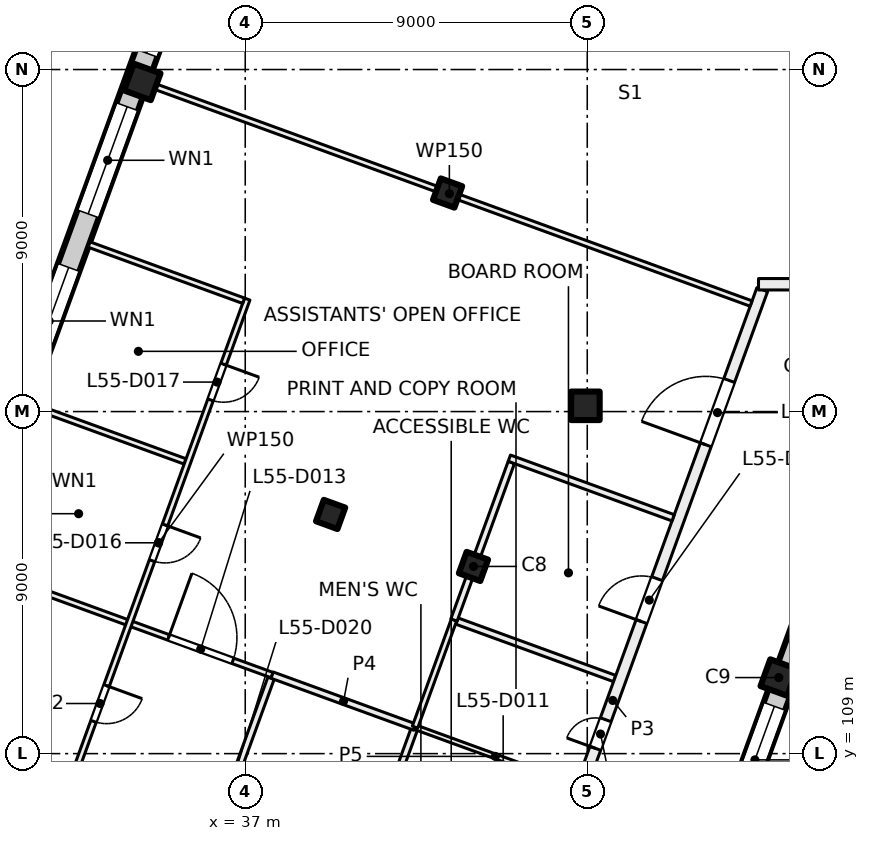
"""IFC4 building model, lengths in metres.
Left out: names, types, materials, properties, quantities, classifications, styles, units other than length and angle.
Written with IfcOpenShell. Run it as: python <this file> out.ifc"""

import sys

from ifc_helpers import new_model, si_unit, direction, frame, frame_2d, origin, origin_2d, place, context, subcontext, project, spatial, rectangle, extrude, element, fill, save


model = new_model("IFC4")
c1 = context("Model", 3, precision=1e-05, world=origin(), true_north=direction((0.0, 1.0)))
c2 = subcontext(c1, "Body", "Model", "MODEL_VIEW")
j1 = project(units=[si_unit("LENGTHUNIT", "METRE"), si_unit("PLANEANGLEUNIT", "RADIAN")], contexts=[c1])
p1 = place(None, origin())
s1 = spatial("IfcSite", under=j1, at=p1, CompositionType="ELEMENT")
p2 = place(p1, origin())
s2 = spatial("IfcBuilding", under=s1, at=p2, CompositionType="ELEMENT")
p3 = place(p2, frame((0.0, 0.0, 232.0)))
s3 = spatial("IfcBuildingStorey", under=s2, at=p3, CompositionType="ELEMENT", Elevation=232.0)
p4 = place(p3, frame((45.952, 118.152, 0.0), z_axis=(0.0, 0.0, 1.0), x_axis=(1.0, 0.0, 0.0)))
e1 = element("IfcColumn", 1, at=p4, inside=s3, PredefinedType="COLUMN", context=c2, shape_type="SweptSolid", body=[
    extrude(rectangle(XDim=0.75, YDim=0.75, at=origin_2d()), origin(), (0.0, 0.0, 1.0), 4.0),
])
for number, where, z_axis, x_axis in (
    (2, (43.006, 113.925, 0.0), (0.0, 0.0, 1.0), (-0.342, -0.94, 0.0)),
    (3, (42.325, 123.751, 0.0), (0.0, 0.0, 1.0), (-0.342, -0.94, 0.0)),
    (4, (39.247, 115.293, 0.0), (0.0, 0.0, 1.0), (-0.342, -0.94, 0.0)),
):
    element("IfcColumn", number, at=place(p3, frame(where, z_axis=z_axis, x_axis=x_axis)), inside=s3, PredefinedType="COLUMN", context=c2, shape_type="SweptSolid", body=[
        extrude(rectangle(XDim=0.6, YDim=0.6, at=origin_2d()), origin(), (0.0, 0.0, 1.0), 4.0),
    ])
for number, where, z_axis, x_axis in (
    (5, (51.04, 111.001, 0.0), (0.0, 0.0, 1.0), (-0.342, -0.94, 0.0)),
    (6, (34.291, 126.675, 0.0), (0.0, 0.0, 1.0), (-0.342, -0.94, 0.0)),
):
    element("IfcColumn", number, at=place(p3, frame(where, z_axis=z_axis, x_axis=x_axis)), inside=s3, PredefinedType="COLUMN", context=c2, shape_type="SweptSolid", body=[
        extrude(rectangle(XDim=0.75, YDim=0.75, at=origin_2d()), origin(), (0.0, 0.0, 1.0), 4.0),
    ])
p5 = place(p3, frame((52.212, 113.783, 0.0), z_axis=(0.0, 0.0, 1.0), x_axis=(-0.34202521188, -0.939690775968, 0.0)))
e7 = element("IfcWall", 7, at=p5, inside=s3, PredefinedType="SOLIDWALL", context=c2, shape_type="SweptSolid", body=[
    extrude(rectangle(XDim=21.745, YDim=0.6, at=frame_2d((10.873, 0.0))), origin(), (0.0, 0.0, 1.0), 3.625),
])
p6 = place(p5, frame((3.765, 0.0, 0.9)))
e8 = element("IfcOpeningElement", 8, at=p6, cuts=e7, PredefinedType="OPENING", context=c2, shape_type="SweptSolid", body=[
    extrude(rectangle(XDim=3.0, YDim=2.4, at=frame_2d((1.5, 1.2))), frame((0.0, 0.31, 0.0), z_axis=(0.0, -1.0, 0.0), x_axis=(1.0, 0.0, 0.0)), (0.0, 0.0, 1.0), 0.62),
])
p7 = place(p5, frame((8.265, 0.0, 0.9)))
e9 = element("IfcOpeningElement", 9, at=p7, cuts=e7, PredefinedType="OPENING", context=c2, shape_type="SweptSolid", body=[
    extrude(rectangle(XDim=3.0, YDim=2.4, at=frame_2d((1.5, 1.2))), frame((0.0, 0.31, 0.0), z_axis=(0.0, -1.0, 0.0), x_axis=(1.0, 0.0, 0.0)), (0.0, 0.0, 1.0), 0.62),
])
p8 = place(p5, frame((12.765, 0.0, 0.9)))
e10 = element("IfcOpeningElement", 10, at=p8, cuts=e7, PredefinedType="OPENING", context=c2, shape_type="SweptSolid", body=[
    extrude(rectangle(XDim=3.0, YDim=2.4, at=frame_2d((1.5, 1.2))), frame((0.0, 0.31, 0.0), z_axis=(0.0, -1.0, 0.0), x_axis=(1.0, 0.0, 0.0)), (0.0, 0.0, 1.0), 0.62),
])
p9 = place(p5, frame((17.265, 0.0, 0.9)))
e11 = element("IfcOpeningElement", 11, at=p9, cuts=e7, PredefinedType="OPENING", context=c2, shape_type="SweptSolid", body=[
    extrude(rectangle(XDim=3.0, YDim=2.4, at=frame_2d((1.5, 1.2))), frame((0.0, 0.31, 0.0), z_axis=(0.0, -1.0, 0.0), x_axis=(1.0, 0.0, 0.0)), (0.0, 0.0, 1.0), 0.62),
])
p10 = place(p3, frame((24.666, 100.669, 0.0), z_axis=(0.0, 0.0, 1.0), x_axis=(0.34201964167, 0.939692803373, 0.0)))
e12 = element("IfcWall", 12, at=p10, inside=s3, PredefinedType="SOLIDWALL", context=c2, shape_type="SweptSolid", body=[
    extrude(rectangle(XDim=32.884, YDim=0.6, at=frame_2d((16.442, 0.0))), origin(), (0.0, 0.0, 1.0), 3.625),
])
p11 = place(p10, frame((1.48, 0.0, 0.9)))
e13 = element("IfcOpeningElement", 13, at=p11, cuts=e12, PredefinedType="OPENING", context=c2, shape_type="SweptSolid", body=[
    extrude(rectangle(XDim=3.0, YDim=2.4, at=frame_2d((1.5, 1.2))), frame((0.0, 0.31, 0.0), z_axis=(0.0, -1.0, 0.0), x_axis=(1.0, 0.0, 0.0)), (0.0, 0.0, 1.0), 0.62),
])
p12 = place(p10, frame((5.98, 0.0, 0.9)))
e14 = element("IfcOpeningElement", 14, at=p12, cuts=e12, PredefinedType="OPENING", context=c2, shape_type="SweptSolid", body=[
    extrude(rectangle(XDim=3.0, YDim=2.4, at=frame_2d((1.5, 1.2))), frame((0.0, 0.31, 0.0), z_axis=(0.0, -1.0, 0.0), x_axis=(1.0, 0.0, 0.0)), (0.0, 0.0, 1.0), 0.62),
])
p13 = place(p10, frame((10.48, 0.0, 0.9)))
e15 = element("IfcOpeningElement", 15, at=p13, cuts=e12, PredefinedType="OPENING", context=c2, shape_type="SweptSolid", body=[
    extrude(rectangle(XDim=3.0, YDim=2.4, at=frame_2d((1.5, 1.2))), frame((0.0, 0.31, 0.0), z_axis=(0.0, -1.0, 0.0), x_axis=(1.0, 0.0, 0.0)), (0.0, 0.0, 1.0), 0.62),
])
p14 = place(p10, frame((14.98, 0.0, 0.9)))
e16 = element("IfcOpeningElement", 16, at=p14, cuts=e12, PredefinedType="OPENING", context=c2, shape_type="SweptSolid", body=[
    extrude(rectangle(XDim=3.0, YDim=2.4, at=frame_2d((1.5, 1.2))), frame((0.0, 0.31, 0.0), z_axis=(0.0, -1.0, 0.0), x_axis=(1.0, 0.0, 0.0)), (0.0, 0.0, 1.0), 0.62),
])
p15 = place(p10, frame((19.48, 0.0, 0.9)))
e17 = element("IfcOpeningElement", 17, at=p15, cuts=e12, PredefinedType="OPENING", context=c2, shape_type="SweptSolid", body=[
    extrude(rectangle(XDim=3.0, YDim=2.4, at=frame_2d((1.5, 1.2))), frame((0.0, 0.31, 0.0), z_axis=(0.0, -1.0, 0.0), x_axis=(1.0, 0.0, 0.0)), (0.0, 0.0, 1.0), 0.62),
])
p16 = place(p10, frame((23.98, 0.0, 0.9)))
e18 = element("IfcOpeningElement", 18, at=p16, cuts=e12, PredefinedType="OPENING", context=c2, shape_type="SweptSolid", body=[
    extrude(rectangle(XDim=3.0, YDim=2.4, at=frame_2d((1.5, 1.2))), frame((0.0, 0.31, 0.0), z_axis=(0.0, -1.0, 0.0), x_axis=(1.0, 0.0, 0.0)), (0.0, 0.0, 1.0), 0.62),
])
p17 = place(p10, frame((28.48, 0.0, 0.9)))
e19 = element("IfcOpeningElement", 19, at=p17, cuts=e12, PredefinedType="OPENING", context=c2, shape_type="SweptSolid", body=[
    extrude(rectangle(XDim=3.0, YDim=2.4, at=frame_2d((1.5, 1.2))), frame((0.0, 0.31, 0.0), z_axis=(0.0, -1.0, 0.0), x_axis=(1.0, 0.0, 0.0)), (0.0, 0.0, 1.0), 0.62),
])
p18 = place(p3, frame((29.814, 113.938, 0.0), z_axis=(0.0, 0.0, 1.0), x_axis=(0.939698351515, -0.342004397867, 0.0)))
e20 = element("IfcWall", 20, at=p18, inside=s3, PredefinedType="PARTITIONING", context=c2, shape_type="SweptSolid", body=[
    extrude(rectangle(XDim=8.401, YDim=0.15, at=frame_2d((4.2, 0.0))), origin(), (0.0, 0.0, 1.0), 3.625),
])
p19 = place(p18, frame((5.5, 0.0, 0.0)))
e21 = element("IfcOpeningElement", 21, at=p19, cuts=e20, PredefinedType="OPENING", context=c2, shape_type="SweptSolid", body=[
    extrude(rectangle(XDim=1.8, YDim=2.1, at=frame_2d((0.9, 1.05))), frame((0.0, 0.085, 0.0), z_axis=(0.0, -1.0, 0.0), x_axis=(1.0, 0.0, 0.0)), (0.0, 0.0, 1.0), 0.17),
])
p20 = place(p3, frame((31.353, 118.166, 0.0), z_axis=(0.0, 0.0, 1.0), x_axis=(0.939803311208, -0.341715870634, 0.0)))
e22 = element("IfcWall", 22, at=p20, inside=s3, PredefinedType="PARTITIONING", context=c2, shape_type="SweptSolid", body=[
    extrude(rectangle(XDim=4.325, YDim=0.15, at=frame_2d((2.163, 0.0))), origin(), (0.0, 0.0, 1.0), 3.625),
])
p21 = place(p3, frame((32.34, 108.23, 0.0), z_axis=(0.0, 0.0, 1.0), x_axis=(-0.939737385516, 0.341897128188, 0.0)))
e23 = element("IfcWall", 23, at=p21, inside=s3, PredefinedType="PARTITIONING", context=c2, shape_type="SweptSolid", body=[
    extrude(rectangle(XDim=4.326, YDim=0.15, at=frame_2d((2.163, 0.0))), origin(), (0.0, 0.0, 1.0), 3.625),
])
p22 = place(p3, frame((37.053, 120.96, 0.0), z_axis=(0.0, 0.0, 1.0), x_axis=(-0.342064742067, -0.939676386973, 0.0)))
e24 = element("IfcWall", 24, at=p22, inside=s3, PredefinedType="PARTITIONING", context=c2, shape_type="SweptSolid", body=[
    extrude(rectangle(XDim=13.649, YDim=0.15, at=frame_2d((6.825, 0.0))), origin(), (0.0, 0.0, 1.0), 3.625),
])
p23 = place(p22, frame((10.824, 0.0, 0.0)))
e25 = element("IfcOpeningElement", 25, at=p23, cuts=e24, PredefinedType="OPENING", context=c2, shape_type="SweptSolid", body=[
    extrude(rectangle(XDim=1.0, YDim=2.1, at=frame_2d((0.5, 1.05))), frame((0.0, 0.085, 0.0), z_axis=(0.0, -1.0, 0.0), x_axis=(1.0, 0.0, 0.0)), (0.0, 0.0, 1.0), 0.17),
])
p24 = place(p22, frame((6.324, 0.0, 0.0)))
e26 = element("IfcOpeningElement", 26, at=p24, cuts=e24, PredefinedType="OPENING", context=c2, shape_type="SweptSolid", body=[
    extrude(rectangle(XDim=1.0, YDim=2.1, at=frame_2d((0.5, 1.05))), frame((0.0, 0.085, 0.0), z_axis=(0.0, -1.0, 0.0), x_axis=(1.0, 0.0, 0.0)), (0.0, 0.0, 1.0), 0.17),
])
p25 = place(p22, frame((1.824, 0.0, 0.0)))
e27 = element("IfcOpeningElement", 27, at=p25, cuts=e24, PredefinedType="OPENING", context=c2, shape_type="SweptSolid", body=[
    extrude(rectangle(XDim=1.0, YDim=2.1, at=frame_2d((0.5, 1.05))), frame((0.0, 0.085, 0.0), z_axis=(0.0, -1.0, 0.0), x_axis=(1.0, 0.0, 0.0)), (0.0, 0.0, 1.0), 0.17),
])
p26 = place(p3, frame((32.892, 122.395, 0.0), z_axis=(0.0, 0.0, 1.0), x_axis=(0.93973078783, -0.341915262023, 0.0)))
e28 = element("IfcWall", 28, at=p26, inside=s3, PredefinedType="PARTITIONING", context=c2, shape_type="SweptSolid", body=[
    extrude(rectangle(XDim=4.326, YDim=0.15, at=frame_2d((2.163, 0.0))), origin(), (0.0, 0.0, 1.0), 3.625),
])
p27 = place(p3, frame((34.66, 102.689, 0.0), z_axis=(0.0, 0.0, 1.0), x_axis=(0.341951828534, 0.939717482524, 0.0)))
e29 = element("IfcWall", 29, at=p27, inside=s3, PredefinedType="PARTITIONING", context=c2, shape_type="SweptSolid", body=[
    extrude(rectangle(XDim=8.826, YDim=0.175, at=frame_2d((4.413, 0.0))), origin(), (0.0, 0.0, 1.0), 3.625),
])
p28 = place(p27, frame((4.813, 0.0, 0.0)))
e30 = element("IfcOpeningElement", 30, at=p28, cuts=e29, PredefinedType="OPENING", context=c2, shape_type="SweptSolid", body=[
    extrude(rectangle(XDim=1.2, YDim=2.1, at=frame_2d((0.6, 1.05))), frame((0.0, 0.097, 0.0), z_axis=(0.0, -1.0, 0.0), x_axis=(1.0, 0.0, 0.0)), (0.0, 0.0, 1.0), 0.195),
])
p29 = place(p3, frame((38.418, 101.322, 0.0), z_axis=(0.0, 0.0, 1.0), x_axis=(0.342101536507, 0.939662992099, 0.0)))
e31 = element("IfcWall", 31, at=p29, inside=s3, PredefinedType="PARTITIONING", context=c2, shape_type="SweptSolid", body=[
    extrude(rectangle(XDim=8.913, YDim=0.175, at=frame_2d((4.457, 0.0))), origin(), (0.0, 0.0, 1.0), 3.625),
])
p30 = place(p3, frame((41.467, 109.697, 0.0), z_axis=(0.0, 0.0, 1.0), x_axis=(-0.939713209288, 0.341963571582, 0.0)))
e32 = element("IfcWall", 32, at=p30, inside=s3, PredefinedType="PARTITIONING", context=c2, shape_type="SweptSolid", body=[
    extrude(rectangle(XDim=4.0, YDim=0.175, at=frame_2d((2.0, 0.0))), origin(), (0.0, 0.0, 1.0), 3.625),
])
p31 = place(p3, frame((41.467, 109.697, 0.0), z_axis=(0.0, 0.0, 1.0), x_axis=(0.939609529273, -0.342248349154, 0.0)))
e33 = element("IfcWall", 33, at=p31, inside=s3, PredefinedType="PARTITIONING", context=c2, shape_type="SweptSolid", body=[
    extrude(rectangle(XDim=4.5, YDim=0.125, at=frame_2d((2.25, 0.0))), origin(), (0.0, 0.0, 1.0), 3.625),
])
p32 = place(p3, frame((42.493, 112.516, 0.0), z_axis=(0.0, 0.0, 1.0), x_axis=(-0.341965219194, -0.939712609717, 0.0)))
e34 = element("IfcWall", 34, at=p32, inside=s3, PredefinedType="PARTITIONING", context=c2, shape_type="SweptSolid", body=[
    extrude(rectangle(XDim=3.0, YDim=0.15, at=frame_2d((1.5, 0.0))), origin(), (0.0, 0.0, 1.0), 3.625),
])
p33 = place(p3, frame((42.575, 112.486, 0.0), z_axis=(0.0, 0.0, 1.0), x_axis=(0.939620446327, -0.342218375959, 0.0)))
e35 = element("IfcWall", 35, at=p33, inside=s3, PredefinedType="PARTITIONING", context=c2, shape_type="SweptSolid", body=[
    extrude(rectangle(XDim=4.412, YDim=0.175, at=frame_2d((2.206, 0.0))), origin(), (0.0, 0.0, 1.0), 3.625),
])
p34 = place(p3, frame((42.737, 99.59, 0.0), z_axis=(0.0, 0.0, 1.0), x_axis=(0.341992703977, 0.939702607438, 0.0)))
e36 = element("IfcWall", 36, at=p34, inside=s3, PredefinedType="PARTITIONING", context=c2, shape_type="SweptSolid", body=[
    extrude(rectangle(XDim=23.006, YDim=0.3, at=frame_2d((11.503, 0.0))), origin(), (0.0, 0.0, 1.0), 3.625),
])
p35 = place(p34, frame((4.062, 0.0, 0.0)))
e37 = element("IfcOpeningElement", 37, at=p35, cuts=e36, PredefinedType="OPENING", context=c2, shape_type="SweptSolid", body=[
    extrude(rectangle(XDim=1.0, YDim=2.1, at=frame_2d((0.5, 1.05))), frame((0.0, 0.16, 0.0), z_axis=(0.0, -1.0, 0.0), x_axis=(1.0, 0.0, 0.0)), (0.0, 0.0, 1.0), 0.32),
])
p36 = place(p34, frame((10.162, 0.0, 0.0)))
e38 = element("IfcOpeningElement", 38, at=p36, cuts=e36, PredefinedType="OPENING", context=c2, shape_type="SweptSolid", body=[
    extrude(rectangle(XDim=0.8, YDim=2.1, at=frame_2d((0.4, 1.05))), frame((0.0, 0.16, 0.0), z_axis=(0.0, -1.0, 0.0), x_axis=(1.0, 0.0, 0.0)), (0.0, 0.0, 1.0), 0.32),
])
p37 = place(p34, frame((13.712, 0.0, 0.0)))
e39 = element("IfcOpeningElement", 39, at=p37, cuts=e36, PredefinedType="OPENING", context=c2, shape_type="SweptSolid", body=[
    extrude(rectangle(XDim=1.2, YDim=2.1, at=frame_2d((0.6, 1.05))), frame((0.0, 0.16, 0.0), z_axis=(0.0, -1.0, 0.0), x_axis=(1.0, 0.0, 0.0)), (0.0, 0.0, 1.0), 0.32),
])
p38 = place(p34, frame((18.662, 0.0, 0.0)))
e40 = element("IfcOpeningElement", 40, at=p38, cuts=e36, PredefinedType="OPENING", context=c2, shape_type="SweptSolid", body=[
    extrude(rectangle(XDim=1.8, YDim=2.1, at=frame_2d((0.9, 1.05))), frame((0.0, 0.16, 0.0), z_axis=(0.0, -1.0, 0.0), x_axis=(1.0, 0.0, 0.0)), (0.0, 0.0, 1.0), 0.32),
])
p39 = place(p3, frame((44.002, 116.662, 0.0), z_axis=(0.0, 0.0, 1.0), x_axis=(-0.342022951975, -0.939691598517, 0.0)))
e41 = element("IfcWall", 41, at=p39, inside=s3, PredefinedType="PARTITIONING", context=c2, shape_type="SweptSolid", body=[
    extrude(rectangle(XDim=4.412, YDim=0.175, at=frame_2d((2.206, 0.0))), origin(), (0.0, 0.0, 1.0), 3.625),
])
p40 = place(p3, frame((48.26, 115.205, 0.0), z_axis=(0.0, 0.0, 1.0), x_axis=(-0.939684589011, 0.34204220964, 0.0)))
e42 = element("IfcWall", 42, at=p40, inside=s3, PredefinedType="PARTITIONING", context=c2, shape_type="SweptSolid", body=[
    extrude(rectangle(XDim=4.587, YDim=0.175, at=frame_2d((2.293, 0.0))), origin(), (0.0, 0.0, 1.0), 3.625),
])
p41 = place(p3, frame((50.311, 120.843, 0.0), z_axis=(0.0, 0.0, 1.0), x_axis=(-0.939664702396, 0.342096838733, 0.0)))
e43 = element("IfcWall", 43, at=p41, inside=s3, PredefinedType="PARTITIONING", context=c2, shape_type="SweptSolid", body=[
    extrude(rectangle(XDim=16.899, YDim=0.15, at=frame_2d((8.449, 0.0))), origin(), (0.0, 0.0, 1.0), 3.625),
])
p42 = place(p3, frame((50.506, 121.35, 0.0), z_axis=(0.0, 0.0, 1.0), x_axis=(1.0, 0.0, 0.0)))
e44 = element("IfcWall", 44, at=p42, inside=s3, PredefinedType="PARTITIONING", context=c2, shape_type="SweptSolid", body=[
    extrude(rectangle(XDim=35.319, YDim=0.3, at=frame_2d((17.659, 0.0))), origin(), (0.0, 0.0, 1.0), 3.625),
])
p43 = place(p42, frame((13.844, 0.0, 0.0)))
e45 = element("IfcOpeningElement", 45, at=p43, cuts=e44, PredefinedType="OPENING", context=c2, shape_type="SweptSolid", body=[
    extrude(rectangle(XDim=0.8, YDim=2.1, at=frame_2d((0.4, 1.05))), frame((0.0, 0.16, 0.0), z_axis=(0.0, -1.0, 0.0), x_axis=(1.0, 0.0, 0.0)), (0.0, 0.0, 1.0), 0.32),
])
p44 = place(p42, frame((9.144, 0.0, 0.0)))
e46 = element("IfcOpeningElement", 46, at=p44, cuts=e44, PredefinedType="OPENING", context=c2, shape_type="SweptSolid", body=[
    extrude(rectangle(XDim=1.2, YDim=2.1, at=frame_2d((0.6, 1.05))), frame((0.0, 0.16, 0.0), z_axis=(0.0, -1.0, 0.0), x_axis=(1.0, 0.0, 0.0)), (0.0, 0.0, 1.0), 0.32),
])
p45 = place(p42, frame((24.594, 0.0, 0.0)))
e47 = element("IfcOpeningElement", 47, at=p45, cuts=e44, PredefinedType="OPENING", context=c2, shape_type="SweptSolid", body=[
    extrude(rectangle(XDim=1.8, YDim=2.1, at=frame_2d((0.9, 1.05))), frame((0.0, 0.16, 0.0), z_axis=(0.0, -1.0, 0.0), x_axis=(1.0, 0.0, 0.0)), (0.0, 0.0, 1.0), 0.32),
])
p46 = place(p42, frame((2.543, 0.0, 0.0)))
e48 = element("IfcOpeningElement", 48, at=p46, cuts=e44, PredefinedType="OPENING", context=c2, shape_type="SweptSolid", body=[
    extrude(rectangle(XDim=1.8, YDim=2.1, at=frame_2d((0.9, 1.05))), frame((0.0, 0.16, 0.0), z_axis=(0.0, -1.0, 0.0), x_axis=(1.0, 0.0, 0.0)), (0.0, 0.0, 1.0), 0.32),
])
p47 = place(p6, origin())
e49 = element("IfcWindow", 49, at=p47, inside=s3, PartitioningType="SINGLE_PANEL", PredefinedType="WINDOW", context=c2, shape_type="SweptSolid", body=[
    extrude(rectangle(XDim=3.0, YDim=2.4, at=frame_2d((1.5, 1.2))), frame((0.0, 0.03, 0.0), z_axis=(0.0, -1.0, 0.0), x_axis=(1.0, 0.0, 0.0)), (0.0, 0.0, 1.0), 0.06),
])
fill(e8, e49)
p48 = place(p15, origin())
e50 = element("IfcWindow", 50, at=p48, inside=s3, PartitioningType="SINGLE_PANEL", PredefinedType="WINDOW", context=c2, shape_type="SweptSolid", body=[
    extrude(rectangle(XDim=3.0, YDim=2.4, at=frame_2d((1.5, 1.2))), frame((0.0, 0.03, 0.0), z_axis=(0.0, -1.0, 0.0), x_axis=(1.0, 0.0, 0.0)), (0.0, 0.0, 1.0), 0.06),
])
fill(e17, e50)
p49 = place(p16, origin())
e51 = element("IfcWindow", 51, at=p49, inside=s3, PartitioningType="SINGLE_PANEL", PredefinedType="WINDOW", context=c2, shape_type="SweptSolid", body=[
    extrude(rectangle(XDim=3.0, YDim=2.4, at=frame_2d((1.5, 1.2))), frame((0.0, 0.03, 0.0), z_axis=(0.0, -1.0, 0.0), x_axis=(1.0, 0.0, 0.0)), (0.0, 0.0, 1.0), 0.06),
])
fill(e18, e51)
p50 = place(p17, origin())
e52 = element("IfcWindow", 52, at=p50, inside=s3, PartitioningType="SINGLE_PANEL", PredefinedType="WINDOW", context=c2, shape_type="SweptSolid", body=[
    extrude(rectangle(XDim=3.0, YDim=2.4, at=frame_2d((1.5, 1.2))), frame((0.0, 0.03, 0.0), z_axis=(0.0, -1.0, 0.0), x_axis=(1.0, 0.0, 0.0)), (0.0, 0.0, 1.0), 0.06),
])
fill(e19, e52)
p51 = place(p23, origin())
e53 = element("IfcDoor", 53, at=p51, inside=s3, OperationType="SINGLE_SWING_LEFT", PredefinedType="DOOR", context=c2, shape_type="SweptSolid", body=[
    extrude(rectangle(XDim=1.0, YDim=2.1, at=frame_2d((0.5, 1.05))), frame((0.0, 0.025, 0.0), z_axis=(0.0, -1.0, 0.0), x_axis=(1.0, 0.0, 0.0)), (0.0, 0.0, 1.0), 0.05),
])
fill(e25, e53)
p52 = place(p19, origin())
e54 = element("IfcDoor", 54, at=p52, inside=s3, OperationType="DOUBLE_DOOR_SINGLE_SWING", PredefinedType="DOOR", context=c2, shape_type="SweptSolid", body=[
    extrude(rectangle(XDim=1.8, YDim=2.1, at=frame_2d((0.9, 1.05))), frame((0.0, 0.025, 0.0), z_axis=(0.0, -1.0, 0.0), x_axis=(1.0, 0.0, 0.0)), (0.0, 0.0, 1.0), 0.05),
])
fill(e21, e54)
p53 = place(p36, origin())
e55 = element("IfcDoor", 55, at=p53, inside=s3, OperationType="SINGLE_SWING_RIGHT", PredefinedType="DOOR", context=c2, shape_type="SweptSolid", body=[
    extrude(rectangle(XDim=0.8, YDim=2.1, at=frame_2d((0.4, 1.05))), frame((0.0, 0.025, 0.0), z_axis=(0.0, -1.0, 0.0), x_axis=(1.0, 0.0, 0.0)), (0.0, 0.0, 1.0), 0.05),
])
fill(e38, e55)
p54 = place(p37, origin())
e56 = element("IfcDoor", 56, at=p54, inside=s3, OperationType="DOUBLE_DOOR_SINGLE_SWING", PredefinedType="DOOR", context=c2, shape_type="SweptSolid", body=[
    extrude(rectangle(XDim=1.2, YDim=2.1, at=frame_2d((0.6, 1.05))), frame((0.0, 0.025, 0.0), z_axis=(0.0, -1.0, 0.0), x_axis=(1.0, 0.0, 0.0)), (0.0, 0.0, 1.0), 0.05),
])
fill(e39, e56)
p55 = place(p24, origin())
e57 = element("IfcDoor", 57, at=p55, inside=s3, OperationType="SINGLE_SWING_RIGHT", PredefinedType="DOOR", context=c2, shape_type="SweptSolid", body=[
    extrude(rectangle(XDim=1.0, YDim=2.1, at=frame_2d((0.5, 1.05))), frame((0.0, 0.025, 0.0), z_axis=(0.0, -1.0, 0.0), x_axis=(1.0, 0.0, 0.0)), (0.0, 0.0, 1.0), 0.05),
])
fill(e26, e57)
p56 = place(p25, origin())
e58 = element("IfcDoor", 58, at=p56, inside=s3, OperationType="SINGLE_SWING_LEFT", PredefinedType="DOOR", context=c2, shape_type="SweptSolid", body=[
    extrude(rectangle(XDim=1.0, YDim=2.1, at=frame_2d((0.5, 1.05))), frame((0.0, 0.025, 0.0), z_axis=(0.0, -1.0, 0.0), x_axis=(1.0, 0.0, 0.0)), (0.0, 0.0, 1.0), 0.05),
])
fill(e27, e58)
p57 = place(p38, origin())
e59 = element("IfcDoor", 59, at=p57, inside=s3, OperationType="DOUBLE_DOOR_SINGLE_SWING", PredefinedType="DOOR", context=c2, shape_type="SweptSolid", body=[
    extrude(rectangle(XDim=1.8, YDim=2.1, at=frame_2d((0.9, 1.05))), frame((0.0, 0.025, 0.0), z_axis=(0.0, -1.0, 0.0), x_axis=(1.0, 0.0, 0.0)), (0.0, 0.0, 1.0), 0.05),
])
fill(e40, e59)
save(model, sys.argv[1])
